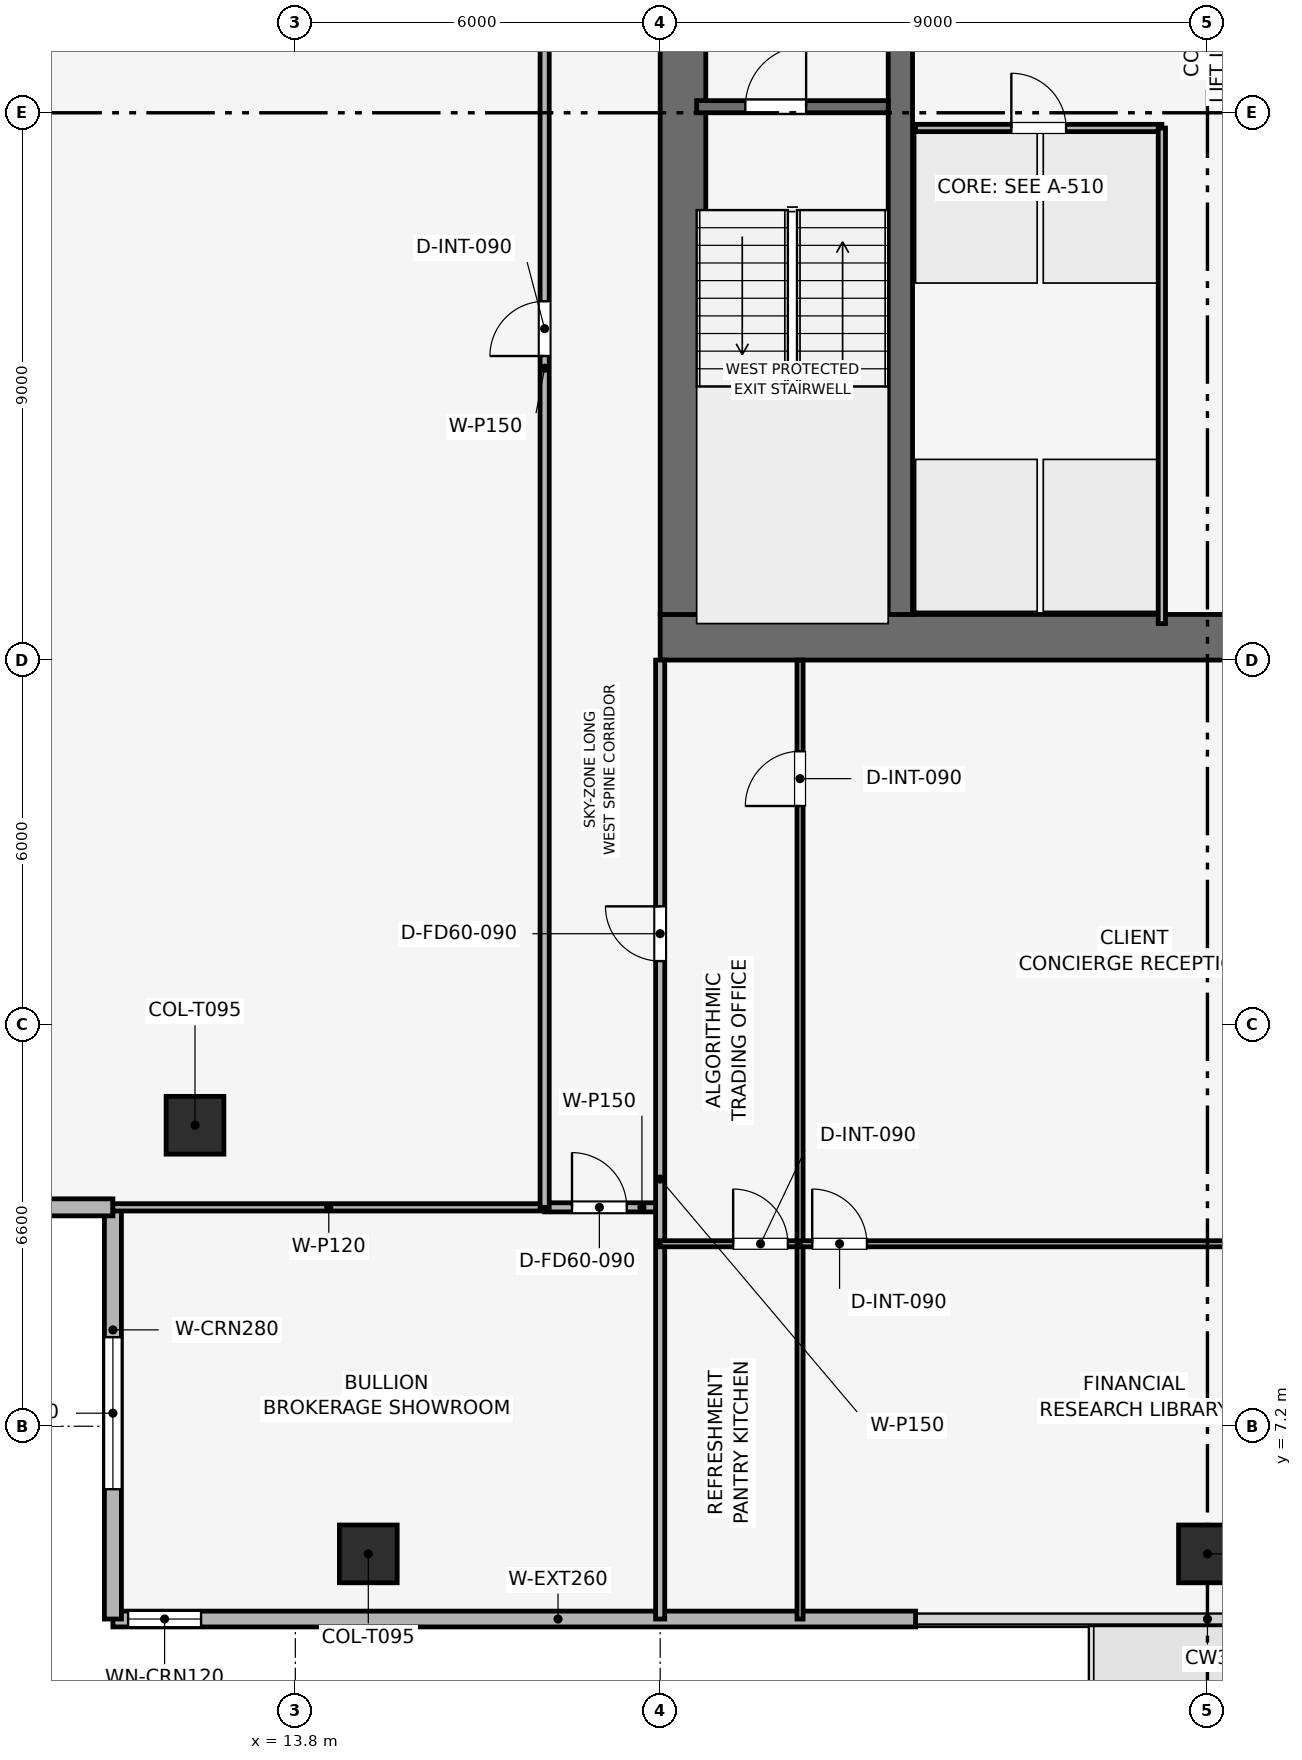
"""IFC4 building model, lengths in metres.
Left out: names, types, materials, properties, quantities, classifications, styles, units other than length and angle.
Written with IfcOpenShell. Run it as: python <this file> out.ifc"""

import sys

from ifc_helpers import new_model, si_unit, direction, frame, frame_2d, origin, origin_2d, place, context, subcontext, project, spatial, rectangle, extrude, element, fill, save


model = new_model("IFC4")
c1 = context("Model", 3, precision=1e-05, world=origin(), true_north=direction((0.0, 1.0)))
c2 = subcontext(c1, "Body", "Model", "MODEL_VIEW")
j1 = project(units=[si_unit("LENGTHUNIT", "METRE"), si_unit("PLANEANGLEUNIT", "RADIAN")], contexts=[c1])
p1 = place(None, origin())
s1 = spatial("IfcSite", under=j1, at=p1, CompositionType="ELEMENT")
p2 = place(p1, origin())
s2 = spatial("IfcBuilding", under=s1, at=p2, CompositionType="ELEMENT")
p3 = place(p2, frame((0.0, 0.0, 280.35)))
s3 = spatial("IfcBuildingStorey", under=s2, at=p3, CompositionType="ELEMENT", Elevation=280.35)
p4 = place(p3, frame((19.8, 20.175, 0.0), z_axis=(0.0, 0.0, 1.0), x_axis=(1.0, 0.0, 0.0)))
e1 = element("IfcWall", 1, at=p4, inside=s3, PredefinedType="SHEAR", context=c2, shape_type="SweptSolid", body=[
    extrude(rectangle(XDim=18.0, YDim=0.75, at=frame_2d((9.0, 0.0))), origin(), (0.0, 0.0, 1.0), 3.75),
])
p5 = place(p3, frame((20.175, 20.55, 0.0), z_axis=(0.0, 0.0, 1.0), x_axis=(0.0, 1.0, 0.0)))
e2 = element("IfcWall", 2, at=p5, inside=s3, PredefinedType="SHEAR", context=c2, shape_type="SweptSolid", body=[
    extrude(rectangle(XDim=16.5, YDim=0.75, at=frame_2d((8.25, 0.0))), origin(), (0.0, 0.0, 1.0), 3.75),
])
p6 = place(p5, frame((10.25, 0.0, 0.0)))
e3 = element("IfcOpeningElement", 3, at=p6, cuts=e2, PredefinedType="OPENING", context=c2, shape_type="SweptSolid", body=[
    extrude(rectangle(XDim=1.1, YDim=2.15, at=frame_2d((0.55, 1.075))), frame((0.0, 0.385, 0.0), z_axis=(0.0, -1.0, 0.0), x_axis=(1.0, 0.0, 0.0)), (0.0, 0.0, 1.0), 0.77),
])
p7 = place(p3, frame((23.75, 20.55, 0.0), z_axis=(0.0, 0.0, 1.0), x_axis=(0.0, 1.0, 0.0)))
e4 = element("IfcWall", 4, at=p7, inside=s3, PredefinedType="SHEAR", context=c2, shape_type="SweptSolid", body=[
    extrude(rectangle(XDim=16.5, YDim=0.4, at=frame_2d((8.25, 0.0))), origin(), (0.0, 0.0, 1.0), 3.75),
])
for number, where, z_axis, x_axis in (
    (5, (15.0, 5.101, 0.003), (0.0, 0.233, 0.972), (-1.0, 0.0, 0.0)),
    (6, (28.8, 5.101, 0.003), (0.0, 0.233, 0.972), (-1.0, 0.0, 0.0)),
):
    element("IfcColumn", number, at=place(p3, frame(where, z_axis=z_axis, x_axis=x_axis)), inside=s3, PredefinedType="COLUMN", context=c2, shape_type="SweptSolid", body=[
        extrude(rectangle(XDim=0.95, YDim=0.95, at=origin_2d()), origin(), (0.0, 0.0, 1.0), 3.48),
    ])
p8 = place(p3, frame((12.15, 12.15, 0.003), z_axis=(0.156204794595, 0.156204794595, 0.975294890939), x_axis=(-0.707106781187, 0.707106781187, 0.0)))
e7 = element("IfcColumn", 7, at=p8, inside=s3, PredefinedType="COLUMN", context=c2, shape_type="SweptSolid", body=[
    extrude(rectangle(XDim=0.95, YDim=0.95, at=origin_2d()), origin(), (0.0, 0.0, 1.0), 3.47),
])
p9 = place(p3, frame((24.0, 4.03, 0.0), z_axis=(0.0, 0.0, 1.0), x_axis=(-1.0, 0.0, 0.0)))
e8 = element("IfcWall", 8, at=p9, inside=s3, PredefinedType="SOLIDWALL", context=c2, shape_type="SweptSolid", body=[
    extrude(rectangle(XDim=13.2, YDim=0.26, at=frame_2d((6.6, 0.0))), origin(), (0.0, 0.0, 1.0), 3.39),
])
p10 = place(p9, frame((11.75, 0.0, 0.72)))
e9 = element("IfcOpeningElement", 9, at=p10, cuts=e8, PredefinedType="OPENING", context=c2, shape_type="SweptSolid", body=[
    extrude(rectangle(XDim=1.2, YDim=2.1, at=frame_2d((0.6, 1.05))), frame((0.0, 0.14, 0.0), z_axis=(0.0, -1.0, 0.0), x_axis=(1.0, 0.0, 0.0)), (0.0, 0.0, 1.0), 0.28),
])
p11 = place(p3, frame((10.8, 4.03, 0.0), z_axis=(0.0, 0.0, 1.0), x_axis=(0.0, 1.0, 0.0)))
e10 = element("IfcWall", 10, at=p11, inside=s3, PredefinedType="SOLIDWALL", context=c2, shape_type="SweptSolid", body=[
    extrude(rectangle(XDim=6.77, YDim=0.28, at=frame_2d((3.385, 0.0))), origin(), (0.0, 0.0, 1.0), 3.39),
])
p12 = place(p11, frame((2.135, 0.0, 0.72)))
e11 = element("IfcOpeningElement", 11, at=p12, cuts=e10, PredefinedType="OPENING", context=c2, shape_type="SweptSolid", body=[
    extrude(rectangle(XDim=2.5, YDim=1.9, at=frame_2d((1.25, 0.95))), frame((0.0, 0.15, 0.0), z_axis=(0.0, -1.0, 0.0), x_axis=(1.0, 0.0, 0.0)), (0.0, 0.0, 1.0), 0.3),
])
p13 = place(p3, frame((10.8, 10.8, 0.0), z_axis=(0.0, 0.0, 1.0), x_axis=(-1.0, 0.0, 0.0)))
e12 = element("IfcWall", 12, at=p13, inside=s3, PredefinedType="SOLIDWALL", context=c2, shape_type="SweptSolid", body=[
    extrude(rectangle(XDim=6.77, YDim=0.28, at=frame_2d((3.385, 0.0))), origin(), (0.0, 0.0, 1.0), 3.39),
])
p14 = place(p13, frame((2.135, 0.0, 0.72)))
e13 = element("IfcOpeningElement", 13, at=p14, cuts=e12, PredefinedType="OPENING", context=c2, shape_type="SweptSolid", body=[
    extrude(rectangle(XDim=2.5, YDim=1.9, at=frame_2d((1.25, 0.95))), frame((0.0, 0.15, 0.0), z_axis=(0.0, -1.0, 0.0), x_axis=(1.0, 0.0, 0.0)), (0.0, 0.0, 1.0), 0.3),
])
p15 = place(p3, frame((20.4, 28.9, 0.0), z_axis=(0.0, 0.0, 1.0), x_axis=(1.0, 0.0, 0.0)))
e14 = element("IfcWall", 14, at=p15, inside=s3, PredefinedType="SHEAR", context=c2, shape_type="SweptSolid", body=[
    extrude(rectangle(XDim=3.15, YDim=0.2, at=frame_2d((1.575, 0.0))), origin(), (0.0, 0.0, 1.0), 3.39),
])
p16 = place(p15, frame((0.8, 0.0, 0.0)))
e15 = element("IfcOpeningElement", 15, at=p16, cuts=e14, PredefinedType="OPENING", context=c2, shape_type="SweptSolid", body=[
    extrude(rectangle(XDim=1.0, YDim=2.1, at=frame_2d((0.5, 1.05))), frame((0.0, 0.11, 0.0), z_axis=(0.0, -1.0, 0.0), x_axis=(1.0, 0.0, 0.0)), (0.0, 0.0, 1.0), 0.22),
])
p17 = place(p3, frame((24.0, 28.55, 0.0), z_axis=(0.0, 0.0, 1.0), x_axis=(1.0, 0.0, 0.0)))
e16 = element("IfcWall", 16, at=p17, inside=s3, PredefinedType="PARTITIONING", context=c2, shape_type="SweptSolid", body=[
    extrude(rectangle(XDim=4.05, YDim=0.12, at=frame_2d((2.025, 0.0))), origin(), (0.0, 0.0, 1.0), 3.39),
])
p18 = place(p17, frame((1.575, 0.0, 0.0)))
e17 = element("IfcOpeningElement", 17, at=p18, cuts=e16, PredefinedType="OPENING", context=c2, shape_type="SweptSolid", body=[
    extrude(rectangle(XDim=0.9, YDim=2.1, at=frame_2d((0.45, 1.05))), frame((0.0, 0.07, 0.0), z_axis=(0.0, -1.0, 0.0), x_axis=(1.0, 0.0, 0.0)), (0.0, 0.0, 1.0), 0.14),
])
p19 = place(p3, frame((28.05, 20.4, 0.0), z_axis=(0.0, 0.0, 1.0), x_axis=(0.0, 1.0, 0.0)))
e18 = element("IfcWall", 18, at=p19, inside=s3, PredefinedType="PARTITIONING", context=c2, shape_type="SweptSolid", body=[
    extrude(rectangle(XDim=8.15, YDim=0.12, at=frame_2d((4.075, 0.0))), origin(), (0.0, 0.0, 1.0), 3.39),
])
p20 = place(p3, frame((10.8, 10.8, 0.0), z_axis=(0.0, 0.0, 1.0), x_axis=(1.0, 0.0, 0.0)))
e19 = element("IfcWall", 19, at=p20, inside=s3, PredefinedType="PARTITIONING", context=c2, shape_type="SweptSolid", body=[
    extrude(rectangle(XDim=7.1, YDim=0.12, at=frame_2d((3.55, 0.0))), origin(), (0.0, 0.0, 1.0), 2.975),
])
p21 = place(p3, frame((17.9, 10.8, 0.0), z_axis=(0.0, 0.0, 1.0), x_axis=(1.0, 0.0, 0.0)))
e20 = element("IfcWall", 20, at=p21, inside=s3, PredefinedType="PARTITIONING", context=c2, shape_type="SweptSolid", body=[
    extrude(rectangle(XDim=1.9, YDim=0.15, at=frame_2d((0.95, 0.0))), origin(), (0.0, 0.0, 1.0), 3.39),
])
p22 = place(p21, frame((0.45, 0.0, 0.0)))
e21 = element("IfcOpeningElement", 21, at=p22, cuts=e20, PredefinedType="OPENING", context=c2, shape_type="SweptSolid", body=[
    extrude(rectangle(XDim=0.9, YDim=2.1, at=frame_2d((0.45, 1.05))), frame((0.0, 0.085, 0.0), z_axis=(0.0, -1.0, 0.0), x_axis=(1.0, 0.0, 0.0)), (0.0, 0.0, 1.0), 0.17),
])
p23 = place(p3, frame((19.8, 4.03, 0.0), z_axis=(0.0, 0.0, 1.0), x_axis=(0.0, 1.0, 0.0)))
e22 = element("IfcWall", 22, at=p23, inside=s3, PredefinedType="PARTITIONING", context=c2, shape_type="SweptSolid", body=[
    extrude(rectangle(XDim=15.77, YDim=0.15, at=frame_2d((7.885, 0.0))), origin(), (0.0, 0.0, 1.0), 2.975),
])
p24 = place(p23, frame((10.82, 0.0, 0.0)))
e23 = element("IfcOpeningElement", 23, at=p24, cuts=e22, PredefinedType="OPENING", context=c2, shape_type="SweptSolid", body=[
    extrude(rectangle(XDim=0.9, YDim=2.1, at=frame_2d((0.45, 1.05))), frame((0.0, 0.085, 0.0), z_axis=(0.0, -1.0, 0.0), x_axis=(1.0, 0.0, 0.0)), (0.0, 0.0, 1.0), 0.17),
])
p25 = place(p3, frame((19.8, 10.201, 0.0), z_axis=(0.0, 0.0, 1.0), x_axis=(1.0, 0.0, 0.0)))
e24 = element("IfcWall", 24, at=p25, inside=s3, PredefinedType="MOVABLE", context=c2, shape_type="SweptSolid", body=[
    extrude(rectangle(XDim=2.3, YDim=0.1, at=frame_2d((1.15, 0.0))), origin(), (0.0, 0.0, 1.0), 2.975),
])
p26 = place(p25, frame((1.2, 0.0, 0.0)))
e25 = element("IfcOpeningElement", 25, at=p26, cuts=e24, PredefinedType="OPENING", context=c2, shape_type="SweptSolid", body=[
    extrude(rectangle(XDim=0.9, YDim=2.1, at=frame_2d((0.45, 1.05))), frame((0.0, 0.06, 0.0), z_axis=(0.0, -1.0, 0.0), x_axis=(1.0, 0.0, 0.0)), (0.0, 0.0, 1.0), 0.12),
])
p27 = place(p3, frame((22.1, 4.03, 0.0), z_axis=(0.0, 0.0, 1.0), x_axis=(0.0, 1.0, 0.0)))
e26 = element("IfcWall", 26, at=p27, inside=s3, PredefinedType="MOVABLE", context=c2, shape_type="SweptSolid", body=[
    extrude(rectangle(XDim=15.77, YDim=0.1, at=frame_2d((7.885, 0.0))), origin(), (0.0, 0.0, 1.0), 2.975),
])
p28 = place(p27, frame((13.37, 0.0, 0.0)))
e27 = element("IfcOpeningElement", 27, at=p28, cuts=e26, PredefinedType="OPENING", context=c2, shape_type="SweptSolid", body=[
    extrude(rectangle(XDim=0.9, YDim=2.1, at=frame_2d((0.45, 1.05))), frame((0.0, 0.06, 0.0), z_axis=(0.0, -1.0, 0.0), x_axis=(1.0, 0.0, 0.0)), (0.0, 0.0, 1.0), 0.12),
])
p29 = place(p3, frame((22.1, 10.201, 0.0), z_axis=(0.0, 0.0, 1.0), x_axis=(1.0, 0.0, 0.0)))
e28 = element("IfcWall", 28, at=p29, inside=s3, PredefinedType="MOVABLE", context=c2, shape_type="SweptSolid", body=[
    extrude(rectangle(XDim=10.992, YDim=0.1, at=frame_2d((5.496, 0.0))), origin(), (0.0, 0.0, 1.0), 2.975),
])
p30 = place(p29, frame((0.2, 0.0, 0.0)))
e29 = element("IfcOpeningElement", 29, at=p30, cuts=e28, PredefinedType="OPENING", context=c2, shape_type="SweptSolid", body=[
    extrude(rectangle(XDim=0.9, YDim=2.1, at=frame_2d((0.45, 1.05))), frame((0.0, 0.06, 0.0), z_axis=(0.0, -1.0, 0.0), x_axis=(1.0, 0.0, 0.0)), (0.0, 0.0, 1.0), 0.12),
])
p31 = place(p3, frame((17.9, 10.8, 0.0), z_axis=(0.0, 0.0, 1.0), x_axis=(0.0, 1.0, 0.0)))
e30 = element("IfcWall", 30, at=p31, inside=s3, PredefinedType="PARTITIONING", context=c2, shape_type="SweptSolid", body=[
    extrude(rectangle(XDim=28.9, YDim=0.15, at=frame_2d((14.45, 0.0))), origin(), (0.0, 0.0, 1.0), 2.975),
])
p32 = place(p31, frame((14.0, 0.0, 0.0)))
e31 = element("IfcOpeningElement", 31, at=p32, cuts=e30, PredefinedType="OPENING", context=c2, shape_type="SweptSolid", body=[
    extrude(rectangle(XDim=0.9, YDim=2.1, at=frame_2d((0.45, 1.05))), frame((0.0, 0.085, 0.0), z_axis=(0.0, -1.0, 0.0), x_axis=(1.0, 0.0, 0.0)), (0.0, 0.0, 1.0), 0.17),
])
p33 = place(p10, origin())
e32 = element("IfcWindow", 32, at=p33, inside=s3, PartitioningType="SINGLE_PANEL", PredefinedType="WINDOW", context=c2, shape_type="SweptSolid", body=[
    extrude(rectangle(XDim=1.2, YDim=2.1, at=frame_2d((0.6, 1.05))), frame((0.0, 0.03, 0.0), z_axis=(0.0, -1.0, 0.0), x_axis=(1.0, 0.0, 0.0)), (0.0, 0.0, 1.0), 0.06),
])
fill(e9, e32)
p34 = place(p12, origin())
e33 = element("IfcWindow", 33, at=p34, inside=s3, PartitioningType="SINGLE_PANEL", PredefinedType="WINDOW", context=c2, shape_type="SweptSolid", body=[
    extrude(rectangle(XDim=2.5, YDim=1.9, at=frame_2d((1.25, 0.95))), frame((0.0, 0.03, 0.0), z_axis=(0.0, -1.0, 0.0), x_axis=(1.0, 0.0, 0.0)), (0.0, 0.0, 1.0), 0.06),
])
fill(e11, e33)
p35 = place(p16, origin())
e34 = element("IfcDoor", 34, at=p35, inside=s3, OperationType="SINGLE_SWING_RIGHT", PredefinedType="DOOR", context=c2, shape_type="SweptSolid", body=[
    extrude(rectangle(XDim=1.0, YDim=2.1, at=frame_2d((0.5, 1.05))), frame((0.0, 0.025, 0.0), z_axis=(0.0, -1.0, 0.0), x_axis=(1.0, 0.0, 0.0)), (0.0, 0.0, 1.0), 0.05),
])
fill(e15, e34)
p36 = place(p18, origin())
e35 = element("IfcDoor", 35, at=p36, inside=s3, OperationType="SINGLE_SWING_LEFT", PredefinedType="DOOR", context=c2, shape_type="SweptSolid", body=[
    extrude(rectangle(XDim=0.9, YDim=2.1, at=frame_2d((0.45, 1.05))), frame((0.0, 0.025, 0.0), z_axis=(0.0, -1.0, 0.0), x_axis=(1.0, 0.0, 0.0)), (0.0, 0.0, 1.0), 0.05),
])
fill(e17, e35)
p37 = place(p22, origin())
e36 = element("IfcDoor", 36, at=p37, inside=s3, OperationType="SINGLE_SWING_LEFT", PredefinedType="DOOR", context=c2, shape_type="SweptSolid", body=[
    extrude(rectangle(XDim=0.9, YDim=2.1, at=frame_2d((0.45, 1.05))), frame((0.0, 0.025, 0.0), z_axis=(0.0, -1.0, 0.0), x_axis=(1.0, 0.0, 0.0)), (0.0, 0.0, 1.0), 0.05),
])
fill(e21, e36)
p38 = place(p24, origin())
e37 = element("IfcDoor", 37, at=p38, inside=s3, OperationType="SINGLE_SWING_RIGHT", PredefinedType="DOOR", context=c2, shape_type="SweptSolid", body=[
    extrude(rectangle(XDim=0.9, YDim=2.1, at=frame_2d((0.45, 1.05))), frame((0.0, 0.025, 0.0), z_axis=(0.0, -1.0, 0.0), x_axis=(1.0, 0.0, 0.0)), (0.0, 0.0, 1.0), 0.05),
])
fill(e23, e37)
p39 = place(p26, origin())
e38 = element("IfcDoor", 38, at=p39, inside=s3, OperationType="SINGLE_SWING_LEFT", PredefinedType="DOOR", context=c2, shape_type="SweptSolid", body=[
    extrude(rectangle(XDim=0.9, YDim=2.1, at=frame_2d((0.45, 1.05))), frame((0.0, 0.025, 0.0), z_axis=(0.0, -1.0, 0.0), x_axis=(1.0, 0.0, 0.0)), (0.0, 0.0, 1.0), 0.05),
])
fill(e25, e38)
p40 = place(p28, origin())
e39 = element("IfcDoor", 39, at=p40, inside=s3, OperationType="SINGLE_SWING_LEFT", PredefinedType="DOOR", context=c2, shape_type="SweptSolid", body=[
    extrude(rectangle(XDim=0.9, YDim=2.1, at=frame_2d((0.45, 1.05))), frame((0.0, 0.025, 0.0), z_axis=(0.0, -1.0, 0.0), x_axis=(1.0, 0.0, 0.0)), (0.0, 0.0, 1.0), 0.05),
])
fill(e27, e39)
p41 = place(p30, origin())
e40 = element("IfcDoor", 40, at=p41, inside=s3, OperationType="SINGLE_SWING_LEFT", PredefinedType="DOOR", context=c2, shape_type="SweptSolid", body=[
    extrude(rectangle(XDim=0.9, YDim=2.1, at=frame_2d((0.45, 1.05))), frame((0.0, 0.025, 0.0), z_axis=(0.0, -1.0, 0.0), x_axis=(1.0, 0.0, 0.0)), (0.0, 0.0, 1.0), 0.05),
])
fill(e29, e40)
p42 = place(p32, origin())
e41 = element("IfcDoor", 41, at=p42, inside=s3, OperationType="SINGLE_SWING_LEFT", PredefinedType="DOOR", context=c2, shape_type="SweptSolid", body=[
    extrude(rectangle(XDim=0.9, YDim=2.1, at=frame_2d((0.45, 1.05))), frame((0.0, 0.025, 0.0), z_axis=(0.0, -1.0, 0.0), x_axis=(1.0, 0.0, 0.0)), (0.0, 0.0, 1.0), 0.05),
])
fill(e31, e41)
save(model, sys.argv[1])
